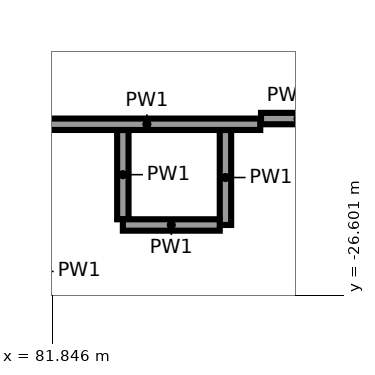
"""IFC4 building model, lengths in metres.
Left out: names, types, materials, properties, quantities, classifications, styles, units other than length and angle.
Written with IfcOpenShell. Run it as: python <this file> out.ifc"""

import sys

from ifc_helpers import new_model, si_unit, direction, frame, frame_2d, origin, place, context, subcontext, project, spatial, rectangle, extrude, element, save


model = new_model("IFC4")
c1 = context("Model", 3, precision=1e-05, world=origin(), true_north=direction((0.0, 1.0)))
c2 = subcontext(c1, "Body", "Model", "MODEL_VIEW")
j1 = project(units=[si_unit("LENGTHUNIT", "METRE"), si_unit("PLANEANGLEUNIT", "RADIAN")], contexts=[c1])
p1 = place(None, origin())
s1 = spatial("IfcSite", under=j1, at=p1, CompositionType="ELEMENT")
p2 = place(p1, origin())
s2 = spatial("IfcBuilding", under=s1, at=p2, CompositionType="ELEMENT")
p3 = place(p2, frame((0.0, 0.0, 18.0)))
s3 = spatial("IfcBuildingStorey", under=s2, at=p3, CompositionType="ELEMENT", Elevation=18.0)
p4 = place(p3, frame((84.583, -24.35, 0.0), z_axis=(0.0, 0.0, 1.0), x_axis=(-1.0, 0.0, 0.0)))
e1 = element("IfcWall", 1, at=p4, inside=s3, PredefinedType="PARTITIONING", context=c2, shape_type="SweptSolid", body=[
    extrude(rectangle(XDim=2.983, YDim=0.15, at=frame_2d((1.491, 0.0))), origin(), (0.0, 0.0, 1.0), 5.6),
])
p5 = place(p3, frame((84.125, -25.675, 0.0), z_axis=(0.0, 0.0, 1.0), x_axis=(0.0, 1.0, 0.0)))
e2 = element("IfcWall", 2, at=p5, inside=s3, PredefinedType="PARTITIONING", context=c2, shape_type="SweptSolid", body=[
    extrude(rectangle(XDim=1.249, YDim=0.15, at=frame_2d((0.625, 0.0))), origin(), (0.0, 0.0, 1.0), 5.6),
])
p6 = place(p3, frame((82.775, -24.426, 0.0), z_axis=(0.0, 0.0, 1.0), x_axis=(0.0, -1.0, 0.0)))
e3 = element("IfcWall", 3, at=p6, inside=s3, PredefinedType="PARTITIONING", context=c2, shape_type="SweptSolid", body=[
    extrude(rectangle(XDim=1.174, YDim=0.15, at=frame_2d((0.587, 0.0))), origin(), (0.0, 0.0, 1.0), 5.6),
])
p7 = place(p3, frame((82.775, -25.675, 0.0), z_axis=(0.0, 0.0, 1.0), x_axis=(1.0, 0.0, 0.0)))
e4 = element("IfcWall", 4, at=p7, inside=s3, PredefinedType="PARTITIONING", context=c2, shape_type="SweptSolid", body=[
    extrude(rectangle(XDim=1.275, YDim=0.15, at=frame_2d((0.638, 0.0))), origin(), (0.0, 0.0, 1.0), 5.6),
])
p8 = place(p3, frame((85.567, -24.275, 0.0), z_axis=(0.0, 0.0, 1.0), x_axis=(-1.0, 0.0, 0.0)))
e5 = element("IfcWall", 5, at=p8, inside=s3, PredefinedType="PARTITIONING", context=c2, shape_type="SweptSolid", body=[
    extrude(rectangle(XDim=0.974, YDim=0.15, at=frame_2d((0.487, 0.0))), origin(), (0.0, 0.0, 1.0), 4.5),
])
save(model, sys.argv[1])
